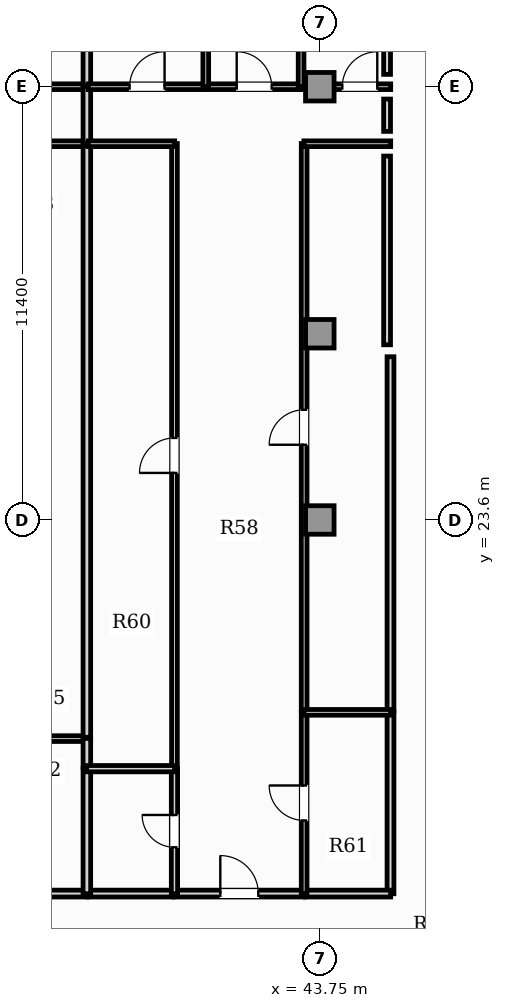
"""IFC4 building model, lengths in metres.
Left out: names, types, materials, properties, quantities, classifications, styles, units other than length and angle.
Written with IfcOpenShell. Run it as: python <this file> out.ifc"""

import sys

from ifc_helpers import new_model, si_unit, direction, frame, frame_2d, origin, origin_2d, place, context, subcontext, project, spatial, rectangle, extrude, element, fill, save


model = new_model("IFC4")
c1 = context("Model", 3, precision=1e-05, world=origin(), true_north=direction((0.0, 1.0)))
c2 = subcontext(c1, "Body", "Model", "MODEL_VIEW")
j1 = project(units=[si_unit("LENGTHUNIT", "METRE"), si_unit("PLANEANGLEUNIT", "RADIAN")], contexts=[c1])
p1 = place(None, origin())
s1 = spatial("IfcSite", under=j1, at=p1, CompositionType="ELEMENT")
p2 = place(p1, origin())
s2 = spatial("IfcBuilding", under=s1, at=p2, CompositionType="ELEMENT")
p3 = place(p2, frame((0.0, 0.0, 119.55)))
s3 = spatial("IfcBuildingStorey", under=s2, at=p3, CompositionType="ELEMENT", Elevation=119.55)
for number, where, z_axis, x_axis in (
    (1, (43.75, 23.6, 0.0), (0.0, 0.0, 1.0), (1.0, 0.0, 0.0)),
    (2, (43.75, 28.5, 0.0), (0.0, 0.0, 1.0), (1.0, 0.0, 0.0)),
    (3, (43.75, 35.0, 0.0), (0.0, 0.0, 1.0), (1.0, 0.0, 0.0)),
):
    element("IfcColumn", number, at=place(p3, frame(where, z_axis=z_axis, x_axis=x_axis)), inside=s3, PredefinedType="COLUMN", context=c2, shape_type="SweptSolid", body=[
        extrude(rectangle(XDim=0.75, YDim=0.75, at=origin_2d()), origin(), (0.0, 0.0, 1.0), 3.85),
    ])
p4 = place(p3, frame((35.013, 13.77, 0.0), z_axis=(0.0, 0.0, 1.0), x_axis=(1.0, 0.0, 0.0)))
e4 = element("IfcWall", 4, at=p4, inside=s3, PredefinedType="PARTITIONING", context=c2, shape_type="SweptSolid", body=[
    extrude(rectangle(XDim=2.613, YDim=0.18, at=frame_2d((1.307, 0.0))), origin(), (0.0, 0.0, 1.0), 3.6),
])
p5 = place(p3, frame((39.92, 13.77, 0.0), z_axis=(0.0, 0.0, 1.0), x_axis=(1.0, 0.0, 0.0)))
e5 = element("IfcWall", 5, at=p5, inside=s3, PredefinedType="PARTITIONING", context=c2, shape_type="SweptSolid", body=[
    extrude(rectangle(XDim=3.422, YDim=0.18, at=frame_2d((1.711, 0.0))), origin(), (0.0, 0.0, 1.0), 3.6),
])
p6 = place(p5, frame((1.211, 0.0, 0.0)))
e6 = element("IfcOpeningElement", 6, at=p6, cuts=e5, PredefinedType="OPENING", context=c2, shape_type="SweptSolid", body=[
    extrude(rectangle(XDim=1.0, YDim=2.15, at=frame_2d((0.5, 1.075))), frame((0.0, 0.1, 0.0), z_axis=(0.0, -1.0, 0.0), x_axis=(1.0, 0.0, 0.0)), (0.0, 0.0, 1.0), 0.2),
])
p7 = place(p3, frame((37.656, 13.77, 0.0), z_axis=(0.0, 0.0, 1.0), x_axis=(1.0, 0.0, 0.0)))
e7 = element("IfcWall", 7, at=p7, inside=s3, PredefinedType="PARTITIONING", context=c2, shape_type="SweptSolid", body=[
    extrude(rectangle(XDim=2.235, YDim=0.18, at=frame_2d((1.117, 0.0))), origin(), (0.0, 0.0, 1.0), 3.6),
])
p8 = place(p3, frame((45.61, 13.765, 0.0), z_axis=(0.0, 0.0, 1.0), x_axis=(0.0, 1.0, 0.0)))
e8 = element("IfcWall", 8, at=p8, inside=s3, PredefinedType="PARTITIONING", context=c2, shape_type="SweptSolid", body=[
    extrude(rectangle(XDim=4.778, YDim=0.18, at=frame_2d((2.389, 0.0))), origin(), (0.0, 0.0, 1.0), 3.6),
])
p9 = place(p3, frame((43.373, 13.77, 0.0), z_axis=(0.0, 0.0, 1.0), x_axis=(1.0, 0.0, 0.0)))
e9 = element("IfcWall", 9, at=p9, inside=s3, PredefinedType="PARTITIONING", context=c2, shape_type="SweptSolid", body=[
    extrude(rectangle(XDim=2.242, YDim=0.18, at=frame_2d((1.121, 0.0))), origin(), (0.0, 0.0, 1.0), 3.6),
])
p10 = place(p3, frame((45.61, 18.573, 0.0), z_axis=(0.0, 0.0, 1.0), x_axis=(0.0, 1.0, 0.0)))
e10 = element("IfcWall", 10, at=p10, inside=s3, PredefinedType="PARTITIONING", context=c2, shape_type="SweptSolid", body=[
    extrude(rectangle(XDim=9.322, YDim=0.18, at=frame_2d((4.661, 0.0))), origin(), (0.0, 0.0, 1.0), 3.6),
])
p11 = place(p3, frame((34.973, 33.5, 0.0), z_axis=(0.0, 0.0, 1.0), x_axis=(1.0, 0.0, 0.0)))
e11 = element("IfcWall", 11, at=p11, inside=s3, PredefinedType="PARTITIONING", context=c2, shape_type="SweptSolid", body=[
    extrude(rectangle(XDim=2.653, YDim=0.15, at=frame_2d((1.327, 0.0))), origin(), (0.0, 0.0, 1.0), 3.6),
])
p12 = place(p3, frame((35.365, 35.0, 0.0), z_axis=(0.0, 0.0, 1.0), x_axis=(1.0, 0.0, 0.0)))
e12 = element("IfcWall", 12, at=p12, inside=s3, PredefinedType="PARTITIONING", context=c2, shape_type="SweptSolid", body=[
    extrude(rectangle(XDim=2.261, YDim=0.15, at=frame_2d((1.131, 0.0))), origin(), (0.0, 0.0, 1.0), 2.983),
])
p13 = place(p3, frame((37.621, 33.495, 0.0), z_axis=(0.0, 0.0, 1.0), x_axis=(0.0, 1.0, 0.0)))
e13 = element("IfcWall", 13, at=p13, inside=s3, PredefinedType="PARTITIONING", context=c2, shape_type="SweptSolid", body=[
    extrude(rectangle(XDim=1.51, YDim=0.2, at=frame_2d((0.755, 0.0))), origin(), (0.0, 0.0, 1.0), 3.6),
])
p14 = place(p3, frame((34.973, 17.847, 0.0), z_axis=(0.0, 0.0, 1.0), x_axis=(1.0, 0.0, 0.0)))
e14 = element("IfcWall", 14, at=p14, inside=s3, PredefinedType="PARTITIONING", context=c2, shape_type="SweptSolid", body=[
    extrude(rectangle(XDim=2.653, YDim=0.15, at=frame_2d((1.327, 0.0))), origin(), (0.0, 0.0, 1.0), 3.6),
])
p15 = place(p3, frame((37.621, 13.765, 0.0), z_axis=(0.0, 0.0, 1.0), x_axis=(0.0, 1.0, 0.0)))
e15 = element("IfcWall", 15, at=p15, inside=s3, PredefinedType="PARTITIONING", context=c2, shape_type="SweptSolid", body=[
    extrude(rectangle(XDim=3.296, YDim=0.2, at=frame_2d((1.648, 0.0))), origin(), (0.0, 0.0, 1.0), 3.6),
])
p16 = place(p3, frame((37.621, 17.091, 0.0), z_axis=(0.0, 0.0, 1.0), x_axis=(0.0, 1.0, 0.0)))
e16 = element("IfcWall", 16, at=p16, inside=s3, PredefinedType="PARTITIONING", context=c2, shape_type="SweptSolid", body=[
    extrude(rectangle(XDim=0.761, YDim=0.2, at=frame_2d((0.38, 0.0))), origin(), (0.0, 0.0, 1.0), 3.6),
])
p17 = place(p3, frame((37.621, 17.882, 0.0), z_axis=(0.0, 0.0, 1.0), x_axis=(0.0, 1.0, 0.0)))
e17 = element("IfcWall", 17, at=p17, inside=s3, PredefinedType="PARTITIONING", context=c2, shape_type="SweptSolid", body=[
    extrude(rectangle(XDim=15.583, YDim=0.2, at=frame_2d((7.792, 0.0))), origin(), (0.0, 0.0, 1.0), 3.6),
])
p18 = place(p3, frame((37.621, 35.035, 0.0), z_axis=(0.0, 0.0, 1.0), x_axis=(0.0, 1.0, 0.0)))
e18 = element("IfcWall", 18, at=p18, inside=s3, PredefinedType="PARTITIONING", context=c2, shape_type="SweptSolid", body=[
    extrude(rectangle(XDim=7.955, YDim=0.2, at=frame_2d((3.978, 0.0))), origin(), (0.0, 0.0, 1.0), 3.6),
])
p19 = place(p3, frame((39.926, 13.765, 0.0), z_axis=(0.0, 0.0, 1.0), x_axis=(0.0, 1.0, 0.0)))
e19 = element("IfcWall", 19, at=p19, inside=s3, PredefinedType="PLUMBINGWALL", context=c2, shape_type="SweptSolid", body=[
    extrude(rectangle(XDim=3.296, YDim=0.165, at=frame_2d((1.648, 0.0))), origin(), (0.0, 0.0, 1.0), 3.6),
])
p20 = place(p19, frame((1.223, 0.0, 0.0)))
e20 = element("IfcOpeningElement", 20, at=p20, cuts=e19, PredefinedType="OPENING", context=c2, shape_type="SweptSolid", body=[
    extrude(rectangle(XDim=0.85, YDim=2.1, at=frame_2d((0.425, 1.05))), frame((0.0, 0.093, 0.0), z_axis=(0.0, -1.0, 0.0), x_axis=(1.0, 0.0, 0.0)), (0.0, 0.0, 1.0), 0.185),
])
p21 = place(p3, frame((39.926, 17.091, 0.0), z_axis=(0.0, 0.0, 1.0), x_axis=(0.0, 1.0, 0.0)))
e21 = element("IfcWall", 21, at=p21, inside=s3, PredefinedType="PARTITIONING", context=c2, shape_type="SweptSolid", body=[
    extrude(rectangle(XDim=16.414, YDim=0.15, at=frame_2d((8.207, 0.0))), origin(), (0.0, 0.0, 1.0), 3.6),
])
p22 = place(p21, frame((7.747, 0.0, 0.0)))
e22 = element("IfcOpeningElement", 22, at=p22, cuts=e21, PredefinedType="OPENING", context=c2, shape_type="SweptSolid", body=[
    extrude(rectangle(XDim=0.92, YDim=2.1, at=frame_2d((0.46, 1.05))), frame((0.0, 0.085, 0.0), z_axis=(0.0, -1.0, 0.0), x_axis=(1.0, 0.0, 0.0)), (0.0, 0.0, 1.0), 0.17),
])
p23 = place(p3, frame((37.656, 33.5, 0.0), z_axis=(0.0, 0.0, 1.0), x_axis=(1.0, 0.0, 0.0)))
e23 = element("IfcWall", 23, at=p23, inside=s3, PredefinedType="PARTITIONING", context=c2, shape_type="SweptSolid", body=[
    extrude(rectangle(XDim=2.275, YDim=0.15, at=frame_2d((1.137, 0.0))), origin(), (0.0, 0.0, 1.0), 3.6),
])
p24 = place(p3, frame((43.338, 13.765, 0.0), z_axis=(0.0, 0.0, 1.0), x_axis=(0.0, 1.0, 0.0)))
e24 = element("IfcWall", 24, at=p24, inside=s3, PredefinedType="PARTITIONING", context=c2, shape_type="SweptSolid", body=[
    extrude(rectangle(XDim=4.778, YDim=0.15, at=frame_2d((2.389, 0.0))), origin(), (0.0, 0.0, 1.0), 3.6),
])
p25 = place(p24, frame((1.929, 0.0, 0.0)))
e25 = element("IfcOpeningElement", 25, at=p25, cuts=e24, PredefinedType="OPENING", context=c2, shape_type="SweptSolid", body=[
    extrude(rectangle(XDim=0.92, YDim=2.1, at=frame_2d((0.46, 1.05))), frame((0.0, 0.085, 0.0), z_axis=(0.0, -1.0, 0.0), x_axis=(1.0, 0.0, 0.0)), (0.0, 0.0, 1.0), 0.17),
])
p26 = place(p3, frame((43.338, 18.573, 0.0), z_axis=(0.0, 0.0, 1.0), x_axis=(0.0, 1.0, 0.0)))
e26 = element("IfcWall", 26, at=p26, inside=s3, PredefinedType="PARTITIONING", context=c2, shape_type="SweptSolid", body=[
    extrude(rectangle(XDim=14.932, YDim=0.15, at=frame_2d((7.466, 0.0))), origin(), (0.0, 0.0, 1.0), 3.6),
])
p27 = place(p26, frame((7.006, 0.0, 0.0)))
e27 = element("IfcOpeningElement", 27, at=p27, cuts=e26, PredefinedType="OPENING", context=c2, shape_type="SweptSolid", body=[
    extrude(rectangle(XDim=0.92, YDim=2.1, at=frame_2d((0.46, 1.05))), frame((0.0, 0.085, 0.0), z_axis=(0.0, -1.0, 0.0), x_axis=(1.0, 0.0, 0.0)), (0.0, 0.0, 1.0), 0.17),
])
p28 = place(p3, frame((43.333, 33.5, 0.0), z_axis=(0.0, 0.0, 1.0), x_axis=(1.0, 0.0, 0.0)))
e28 = element("IfcWall", 28, at=p28, inside=s3, PredefinedType="PARTITIONING", context=c2, shape_type="SweptSolid", body=[
    extrude(rectangle(XDim=2.282, YDim=0.15, at=frame_2d((1.141, 0.0))), origin(), (0.0, 0.0, 1.0), 3.6),
])
p29 = place(p3, frame((37.656, 35.0, 0.0), z_axis=(0.0, 0.0, 1.0), x_axis=(1.0, 0.0, 0.0)))
e29 = element("IfcWall", 29, at=p29, inside=s3, PredefinedType="PARTITIONING", context=c2, shape_type="SweptSolid", body=[
    extrude(rectangle(XDim=3.099, YDim=0.15, at=frame_2d((1.549, 0.0))), origin(), (0.0, 0.0, 1.0), 2.983),
])
p30 = place(p29, frame((1.089, 0.0, 0.0)))
e30 = element("IfcOpeningElement", 30, at=p30, cuts=e29, PredefinedType="OPENING", context=c2, shape_type="SweptSolid", body=[
    extrude(rectangle(XDim=0.92, YDim=2.1, at=frame_2d((0.46, 1.05))), frame((0.0, 0.085, 0.0), z_axis=(0.0, -1.0, 0.0), x_axis=(1.0, 0.0, 0.0)), (0.0, 0.0, 1.0), 0.17),
])
p31 = place(p3, frame((40.784, 35.0, 0.0), z_axis=(0.0, 0.0, 1.0), x_axis=(1.0, 0.0, 0.0)))
e31 = element("IfcWall", 31, at=p31, inside=s3, PredefinedType="PARTITIONING", context=c2, shape_type="SweptSolid", body=[
    extrude(rectangle(XDim=2.478, YDim=0.15, at=frame_2d((1.239, 0.0))), origin(), (0.0, 0.0, 1.0), 2.983),
])
p32 = place(p31, frame((0.779, 0.0, 0.0)))
e32 = element("IfcOpeningElement", 32, at=p32, cuts=e31, PredefinedType="OPENING", context=c2, shape_type="SweptSolid", body=[
    extrude(rectangle(XDim=0.92, YDim=2.1, at=frame_2d((0.46, 1.05))), frame((0.0, 0.085, 0.0), z_axis=(0.0, -1.0, 0.0), x_axis=(1.0, 0.0, 0.0)), (0.0, 0.0, 1.0), 0.17),
])
p33 = place(p3, frame((43.292, 35.0, 0.0), z_axis=(0.0, 0.0, 1.0), x_axis=(1.0, 0.0, 0.0)))
e33 = element("IfcWall", 33, at=p33, inside=s3, PredefinedType="PARTITIONING", context=c2, shape_type="SweptSolid", body=[
    extrude(rectangle(XDim=2.323, YDim=0.15, at=frame_2d((1.161, 0.0))), origin(), (0.0, 0.0, 1.0), 2.983),
])
p34 = place(p33, frame((1.05, 0.0, 0.0)))
e34 = element("IfcOpeningElement", 34, at=p34, cuts=e33, PredefinedType="OPENING", context=c2, shape_type="SweptSolid", body=[
    extrude(rectangle(XDim=0.92, YDim=2.1, at=frame_2d((0.46, 1.05))), frame((0.0, 0.085, 0.0), z_axis=(0.0, -1.0, 0.0), x_axis=(1.0, 0.0, 0.0)), (0.0, 0.0, 1.0), 0.17),
])
p35 = place(p3, frame((37.616, 17.056, 0.0), z_axis=(0.0, 0.0, 1.0), x_axis=(1.0, 0.0, 0.0)))
e35 = element("IfcWall", 35, at=p35, inside=s3, PredefinedType="PLUMBINGWALL", context=c2, shape_type="SweptSolid", body=[
    extrude(rectangle(XDim=2.315, YDim=0.165, at=frame_2d((1.157, 0.0))), origin(), (0.0, 0.0, 1.0), 3.6),
])
p36 = place(p3, frame((43.333, 18.538, 0.0), z_axis=(0.0, 0.0, 1.0), x_axis=(1.0, 0.0, 0.0)))
e36 = element("IfcWall", 36, at=p36, inside=s3, PredefinedType="PARTITIONING", context=c2, shape_type="SweptSolid", body=[
    extrude(rectangle(XDim=2.282, YDim=0.15, at=frame_2d((1.141, 0.0))), origin(), (0.0, 0.0, 1.0), 3.6),
])
for number, where, z_axis, x_axis in (
    (37, (40.75, 34.995, 0.0), (0.0, 0.0, 1.0), (0.0, 1.0, 0.0)),
    (38, (43.257, 34.995, 0.0), (0.0, 0.0, 1.0), (0.0, 1.0, 0.0)),
):
    element("IfcWall", number, at=place(p3, frame(where, z_axis=z_axis, x_axis=x_axis)), inside=s3, PredefinedType="PARTITIONING", context=c2, shape_type="SweptSolid", body=[
        extrude(rectangle(XDim=7.995, YDim=0.15, at=frame_2d((3.998, 0.0))), origin(), (0.0, 0.0, 1.0), 3.6),
    ])
p37 = place(p3, frame((45.52, 34.675, 0.0), z_axis=(0.0, 0.0, 1.0), x_axis=(0.0, -1.0, 0.0)))
e39 = element("IfcWall", 39, at=p37, inside=s3, PredefinedType="PARTITIONING", context=c2, shape_type="SweptSolid", body=[
    extrude(rectangle(XDim=0.85, YDim=0.18, at=frame_2d((0.425, 0.0))), origin(), (0.0, 0.0, 1.0), 3.6),
])
p38 = place(p3, frame((45.52, 33.175, 0.0), z_axis=(0.0, 0.0, 1.0), x_axis=(0.0, -1.0, 0.0)))
e40 = element("IfcWall", 40, at=p38, inside=s3, PredefinedType="PARTITIONING", context=c2, shape_type="SweptSolid", body=[
    extrude(rectangle(XDim=4.965, YDim=0.18, at=frame_2d((2.482, 0.0))), origin(), (0.0, 0.0, 1.0), 3.6),
])
p39 = place(p3, frame((45.52, 42.99, 0.0), z_axis=(0.0, 0.0, 1.0), x_axis=(0.0, -1.0, 0.0)))
e41 = element("IfcWall", 41, at=p39, inside=s3, PredefinedType="PARTITIONING", context=c2, shape_type="SweptSolid", body=[
    extrude(rectangle(XDim=7.665, YDim=0.18, at=frame_2d((3.833, 0.0))), origin(), (0.0, 0.0, 1.0), 3.6),
])
p40 = place(p6, origin())
e42 = element("IfcDoor", 42, at=p40, inside=s3, OperationType="SINGLE_SWING_LEFT", PredefinedType="DOOR", context=c2, shape_type="SweptSolid", body=[
    extrude(rectangle(XDim=1.0, YDim=2.15, at=frame_2d((0.5, 1.075))), frame((0.0, 0.025, 0.0), z_axis=(0.0, -1.0, 0.0), x_axis=(1.0, 0.0, 0.0)), (0.0, 0.0, 1.0), 0.05),
])
fill(e6, e42)
p41 = place(p20, origin())
e43 = element("IfcDoor", 43, at=p41, inside=s3, OperationType="SINGLE_SWING_RIGHT", PredefinedType="DOOR", context=c2, shape_type="SweptSolid", body=[
    extrude(rectangle(XDim=0.85, YDim=2.1, at=frame_2d((0.425, 1.05))), frame((0.0, 0.025, 0.0), z_axis=(0.0, -1.0, 0.0), x_axis=(1.0, 0.0, 0.0)), (0.0, 0.0, 1.0), 0.05),
])
fill(e20, e43)
p42 = place(p22, origin())
e44 = element("IfcDoor", 44, at=p42, inside=s3, OperationType="SINGLE_SWING_LEFT", PredefinedType="DOOR", context=c2, shape_type="SweptSolid", body=[
    extrude(rectangle(XDim=0.92, YDim=2.1, at=frame_2d((0.46, 1.05))), frame((0.0, 0.025, 0.0), z_axis=(0.0, -1.0, 0.0), x_axis=(1.0, 0.0, 0.0)), (0.0, 0.0, 1.0), 0.05),
])
fill(e22, e44)
p43 = place(p25, origin())
e45 = element("IfcDoor", 45, at=p43, inside=s3, OperationType="SINGLE_SWING_RIGHT", PredefinedType="DOOR", context=c2, shape_type="SweptSolid", body=[
    extrude(rectangle(XDim=0.92, YDim=2.1, at=frame_2d((0.46, 1.05))), frame((0.0, 0.025, 0.0), z_axis=(0.0, -1.0, 0.0), x_axis=(1.0, 0.0, 0.0)), (0.0, 0.0, 1.0), 0.05),
])
fill(e25, e45)
p44 = place(p27, origin())
e46 = element("IfcDoor", 46, at=p44, inside=s3, OperationType="SINGLE_SWING_LEFT", PredefinedType="DOOR", context=c2, shape_type="SweptSolid", body=[
    extrude(rectangle(XDim=0.92, YDim=2.1, at=frame_2d((0.46, 1.05))), frame((0.0, 0.025, 0.0), z_axis=(0.0, -1.0, 0.0), x_axis=(1.0, 0.0, 0.0)), (0.0, 0.0, 1.0), 0.05),
])
fill(e27, e46)
p45 = place(p30, origin())
e47 = element("IfcDoor", 47, at=p45, inside=s3, OperationType="SINGLE_SWING_RIGHT", PredefinedType="DOOR", context=c2, shape_type="SweptSolid", body=[
    extrude(rectangle(XDim=0.92, YDim=2.1, at=frame_2d((0.46, 1.05))), frame((0.0, 0.025, 0.0), z_axis=(0.0, -1.0, 0.0), x_axis=(1.0, 0.0, 0.0)), (0.0, 0.0, 1.0), 0.05),
])
fill(e30, e47)
p46 = place(p32, origin())
e48 = element("IfcDoor", 48, at=p46, inside=s3, OperationType="SINGLE_SWING_LEFT", PredefinedType="DOOR", context=c2, shape_type="SweptSolid", body=[
    extrude(rectangle(XDim=0.92, YDim=2.1, at=frame_2d((0.46, 1.05))), frame((0.0, 0.025, 0.0), z_axis=(0.0, -1.0, 0.0), x_axis=(1.0, 0.0, 0.0)), (0.0, 0.0, 1.0), 0.05),
])
fill(e32, e48)
p47 = place(p34, origin())
e49 = element("IfcDoor", 49, at=p47, inside=s3, OperationType="SINGLE_SWING_RIGHT", PredefinedType="DOOR", context=c2, shape_type="SweptSolid", body=[
    extrude(rectangle(XDim=0.92, YDim=2.1, at=frame_2d((0.46, 1.05))), frame((0.0, 0.025, 0.0), z_axis=(0.0, -1.0, 0.0), x_axis=(1.0, 0.0, 0.0)), (0.0, 0.0, 1.0), 0.05),
])
fill(e34, e49)
save(model, sys.argv[1])
